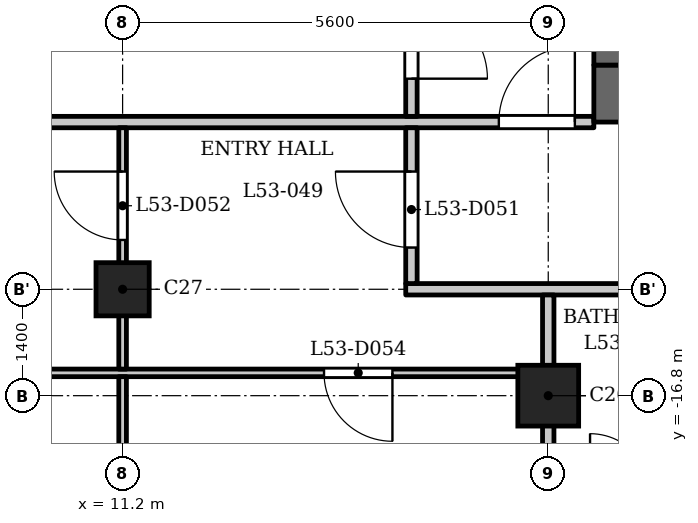
"""IFC4 building model, lengths in metres.
Left out: names, types, materials, properties, quantities, classifications, styles, units other than length and angle.
Written with IfcOpenShell. Run it as: python <this file> out.ifc"""

import sys

from ifc_helpers import new_model, si_unit, direction, frame, frame_2d, origin, origin_2d, place, context, subcontext, project, spatial, rectangle, extrude, element, fill, save


model = new_model("IFC4")
c1 = context("Model", 3, precision=1e-05, world=origin(), true_north=direction((0.0, 1.0)))
c2 = subcontext(c1, "Body", "Model", "MODEL_VIEW")
j1 = project(units=[si_unit("LENGTHUNIT", "METRE"), si_unit("PLANEANGLEUNIT", "RADIAN")], contexts=[c1])
p1 = place(None, origin())
s1 = spatial("IfcSite", under=j1, at=p1, CompositionType="ELEMENT")
p2 = place(p1, origin())
s2 = spatial("IfcBuilding", under=s1, at=p2, CompositionType="ELEMENT")
p3 = place(p2, frame((0.0, 0.0, 206.4)))
s3 = spatial("IfcBuildingStorey", under=s2, at=p3, CompositionType="ELEMENT", Elevation=206.4)
p4 = place(p3, frame((16.8, -16.8, 0.0), z_axis=(0.0, 0.0, 1.0), x_axis=(1.0, 0.0, 0.0)))
e1 = element("IfcColumn", 1, at=p4, inside=s3, PredefinedType="COLUMN", context=c2, shape_type="SweptSolid", body=[
    extrude(rectangle(XDim=0.8, YDim=0.8, at=origin_2d()), origin(), (0.0, 0.0, 1.0), 3.5),
])
p5 = place(p3, frame((11.2, -15.4, 0.0), z_axis=(0.0, 0.0, 1.0), x_axis=(1.0, 0.0, 0.0)))
e2 = element("IfcColumn", 2, at=p5, inside=s3, PredefinedType="COLUMN", context=c2, shape_type="SweptSolid", body=[
    extrude(rectangle(XDim=0.7, YDim=0.7, at=origin_2d()), origin(), (0.0, 0.0, 1.0), 3.5),
])
p6 = place(p3, frame((17.4, -12.825, 0.0), z_axis=(0.0, 0.0, 1.0), x_axis=(1.0, 0.0, 0.0)))
e3 = element("IfcWall", 3, at=p6, inside=s3, PredefinedType="SHEAR", context=c2, shape_type="SweptSolid", body=[
    extrude(rectangle(XDim=7.6, YDim=0.75, at=frame_2d((3.8, 0.0))), origin(), (0.0, 0.0, 1.0), 3.2),
])
p7 = place(p3, frame((17.6, -12.45, 0.0), z_axis=(0.0, 0.0, 1.0), x_axis=(0.0, 1.0, 0.0)))
e4 = element("IfcWall", 4, at=p7, inside=s3, PredefinedType="SHEAR", context=c2, shape_type="SweptSolid", body=[
    extrude(rectangle(XDim=24.9, YDim=0.4, at=frame_2d((12.45, 0.0))), origin(), (0.0, 0.0, 1.0), 3.2),
])
p8 = place(p7, frame((8.65, 0.0, 0.0)))
e5 = element("IfcOpeningElement", 5, at=p8, cuts=e4, PredefinedType="OPENING", context=c2, shape_type="SweptSolid", body=[
    extrude(rectangle(XDim=0.9, YDim=2.1, at=frame_2d((0.45, 1.05))), frame((0.0, 0.21, 0.0), z_axis=(0.0, -1.0, 0.0), x_axis=(1.0, 0.0, 0.0)), (0.0, 0.0, 1.0), 0.42),
])
p9 = place(p7, frame((15.6, 0.0, 0.0)))
e6 = element("IfcOpeningElement", 6, at=p9, cuts=e4, PredefinedType="OPENING", context=c2, shape_type="SweptSolid", body=[
    extrude(rectangle(XDim=1.1, YDim=2.1, at=frame_2d((0.55, 1.05))), frame((0.0, 0.21, 0.0), z_axis=(0.0, -1.0, 0.0), x_axis=(1.0, 0.0, 0.0)), (0.0, 0.0, 1.0), 0.42),
])
p10 = place(p7, frame((18.0, 0.0, 0.0)))
e7 = element("IfcOpeningElement", 7, at=p10, cuts=e4, PredefinedType="OPENING", context=c2, shape_type="SweptSolid", body=[
    extrude(rectangle(XDim=1.1, YDim=2.1, at=frame_2d((0.55, 1.05))), frame((0.0, 0.21, 0.0), z_axis=(0.0, -1.0, 0.0), x_axis=(1.0, 0.0, 0.0)), (0.0, 0.0, 1.0), 0.42),
])
p11 = place(p7, frame((23.025, 0.0, 0.0)))
e8 = element("IfcOpeningElement", 8, at=p11, cuts=e4, PredefinedType="OPENING", context=c2, shape_type="SweptSolid", body=[
    extrude(rectangle(XDim=1.1, YDim=2.1, at=frame_2d((0.55, 1.05))), frame((0.0, 0.21, 0.0), z_axis=(0.0, -1.0, 0.0), x_axis=(1.0, 0.0, 0.0)), (0.0, 0.0, 1.0), 0.42),
])
p12 = place(p7, frame((0.775, 0.0, 0.0)))
e9 = element("IfcOpeningElement", 9, at=p12, cuts=e4, PredefinedType="OPENING", context=c2, shape_type="SweptSolid", body=[
    extrude(rectangle(XDim=1.1, YDim=2.1, at=frame_2d((0.55, 1.05))), frame((0.0, 0.21, 0.0), z_axis=(0.0, -1.0, 0.0), x_axis=(1.0, 0.0, 0.0)), (0.0, 0.0, 1.0), 0.42),
])
p13 = place(p7, frame((12.925, 0.0, 0.0)))
e10 = element("IfcOpeningElement", 10, at=p13, cuts=e4, PredefinedType="OPENING", context=c2, shape_type="SweptSolid", body=[
    extrude(rectangle(XDim=1.8, YDim=2.1, at=frame_2d((0.9, 1.05))), frame((0.0, 0.21, 0.0), z_axis=(0.0, -1.0, 0.0), x_axis=(1.0, 0.0, 0.0)), (0.0, 0.0, 1.0), 0.42),
])
p14 = place(p3, frame((-16.725, -16.5, 0.0), z_axis=(0.0, 0.0, 1.0), x_axis=(1.0, 0.0, 0.0)))
e11 = element("IfcWall", 11, at=p14, inside=s3, PredefinedType="PARTITIONING", context=c2, shape_type="SweptSolid", body=[
    extrude(rectangle(XDim=33.45, YDim=0.1, at=frame_2d((16.725, 0.0))), origin(), (0.0, 0.0, 1.0), 3.2),
])
p15 = place(p14, frame((4.075, 0.0, 0.0)))
e12 = element("IfcOpeningElement", 12, at=p15, cuts=e11, PredefinedType="OPENING", context=c2, shape_type="SweptSolid", body=[
    extrude(rectangle(XDim=0.9, YDim=2.1, at=frame_2d((0.45, 1.05))), frame((0.0, 0.06, 0.0), z_axis=(0.0, -1.0, 0.0), x_axis=(1.0, 0.0, 0.0)), (0.0, 0.0, 1.0), 0.12),
])
p16 = place(p14, frame((6.175, 0.0, 0.0)))
e13 = element("IfcOpeningElement", 13, at=p16, cuts=e11, PredefinedType="OPENING", context=c2, shape_type="SweptSolid", body=[
    extrude(rectangle(XDim=0.9, YDim=2.1, at=frame_2d((0.45, 1.05))), frame((0.0, 0.06, 0.0), z_axis=(0.0, -1.0, 0.0), x_axis=(1.0, 0.0, 0.0)), (0.0, 0.0, 1.0), 0.12),
])
p17 = place(p14, frame((30.575, 0.0, 0.0)))
e14 = element("IfcOpeningElement", 14, at=p17, cuts=e11, PredefinedType="OPENING", context=c2, shape_type="SweptSolid", body=[
    extrude(rectangle(XDim=0.9, YDim=2.1, at=frame_2d((0.45, 1.05))), frame((0.0, 0.06, 0.0), z_axis=(0.0, -1.0, 0.0), x_axis=(1.0, 0.0, 0.0)), (0.0, 0.0, 1.0), 0.12),
])
p18 = place(p14, frame((22.975, 0.0, 0.0)))
e15 = element("IfcOpeningElement", 15, at=p18, cuts=e11, PredefinedType="OPENING", context=c2, shape_type="SweptSolid", body=[
    extrude(rectangle(XDim=0.9, YDim=2.1, at=frame_2d((0.45, 1.05))), frame((0.0, 0.06, 0.0), z_axis=(0.0, -1.0, 0.0), x_axis=(1.0, 0.0, 0.0)), (0.0, 0.0, 1.0), 0.12),
])
p19 = place(p3, frame((14.925, -15.4, 0.0), z_axis=(0.0, 0.0, 1.0), x_axis=(1.0, 0.0, 0.0)))
e16 = element("IfcWall", 16, at=p19, inside=s3, PredefinedType="PARTITIONING", context=c2, shape_type="SweptSolid", body=[
    extrude(rectangle(XDim=9.759, YDim=0.15, at=frame_2d((4.879, 0.0))), origin(), (0.0, 0.0, 1.0), 3.2),
])
p20 = place(p19, frame((4.525, 0.0, 0.0)))
e17 = element("IfcOpeningElement", 17, at=p20, cuts=e16, PredefinedType="OPENING", context=c2, shape_type="SweptSolid", body=[
    extrude(rectangle(XDim=1.0, YDim=2.1, at=frame_2d((0.5, 1.05))), frame((0.0, 0.085, 0.0), z_axis=(0.0, -1.0, 0.0), x_axis=(1.0, 0.0, 0.0)), (0.0, 0.0, 1.0), 0.17),
])
p21 = place(p3, frame((-17.4, -13.2, 0.0), z_axis=(0.0, 0.0, 1.0), x_axis=(1.0, 0.0, 0.0)))
e18 = element("IfcWall", 18, at=p21, inside=s3, PredefinedType="PARTITIONING", context=c2, shape_type="SweptSolid", body=[
    extrude(rectangle(XDim=34.8, YDim=0.15, at=frame_2d((17.4, 0.0))), origin(), (0.0, 0.0, 1.0), 3.2),
])
p22 = place(p21, frame((0.15, 0.0, 0.0)))
e19 = element("IfcOpeningElement", 19, at=p22, cuts=e18, PredefinedType="OPENING", context=c2, shape_type="SweptSolid", body=[
    extrude(rectangle(XDim=1.0, YDim=2.1, at=frame_2d((0.5, 1.05))), frame((0.0, 0.085, 0.0), z_axis=(0.0, -1.0, 0.0), x_axis=(1.0, 0.0, 0.0)), (0.0, 0.0, 1.0), 0.17),
])
p23 = place(p21, frame((33.55, 0.0, 0.0)))
e20 = element("IfcOpeningElement", 20, at=p23, cuts=e18, PredefinedType="OPENING", context=c2, shape_type="SweptSolid", body=[
    extrude(rectangle(XDim=1.0, YDim=2.1, at=frame_2d((0.5, 1.05))), frame((0.0, 0.085, 0.0), z_axis=(0.0, -1.0, 0.0), x_axis=(1.0, 0.0, 0.0)), (0.0, 0.0, 1.0), 0.17),
])
p24 = place(p3, frame((11.2, -22.08, 0.0), z_axis=(0.0, 0.0, 1.0), x_axis=(0.0, 1.0, 0.0)))
e21 = element("IfcWall", 21, at=p24, inside=s3, PredefinedType="PARTITIONING", context=c2, shape_type="SweptSolid", body=[
    extrude(rectangle(XDim=5.53, YDim=0.1, at=frame_2d((2.765, 0.0))), origin(), (0.0, 0.0, 1.0), 3.2),
])
p25 = place(p3, frame((11.2, -16.45, 0.0), z_axis=(0.0, 0.0, 1.0), x_axis=(0.0, 1.0, 0.0)))
e22 = element("IfcWall", 22, at=p25, inside=s3, PredefinedType="PARTITIONING", context=c2, shape_type="SweptSolid", body=[
    extrude(rectangle(XDim=3.175, YDim=0.1, at=frame_2d((1.587, 0.0))), origin(), (0.0, 0.0, 1.0), 3.2),
])
p26 = place(p25, frame((1.699, 0.0, 0.0)))
e23 = element("IfcOpeningElement", 23, at=p26, cuts=e22, PredefinedType="OPENING", context=c2, shape_type="SweptSolid", body=[
    extrude(rectangle(XDim=0.9, YDim=2.1, at=frame_2d((0.45, 1.05))), frame((0.0, 0.06, 0.0), z_axis=(0.0, -1.0, 0.0), x_axis=(1.0, 0.0, 0.0)), (0.0, 0.0, 1.0), 0.12),
])
p27 = place(p3, frame((15.0, -15.325, 0.0), z_axis=(0.0, 0.0, 1.0), x_axis=(0.0, 1.0, 0.0)))
e24 = element("IfcWall", 24, at=p27, inside=s3, PredefinedType="PARTITIONING", context=c2, shape_type="SweptSolid", body=[
    extrude(rectangle(XDim=2.05, YDim=0.15, at=frame_2d((1.025, 0.0))), origin(), (0.0, 0.0, 1.0), 3.2),
])
p28 = place(p27, frame((0.474, 0.0, 0.0)))
e25 = element("IfcOpeningElement", 25, at=p28, cuts=e24, PredefinedType="OPENING", context=c2, shape_type="SweptSolid", body=[
    extrude(rectangle(XDim=1.0, YDim=2.1, at=frame_2d((0.5, 1.05))), frame((0.0, 0.085, 0.0), z_axis=(0.0, -1.0, 0.0), x_axis=(1.0, 0.0, 0.0)), (0.0, 0.0, 1.0), 0.17),
])
p29 = place(p3, frame((15.0, -13.125, 0.0), z_axis=(0.0, 0.0, 1.0), x_axis=(0.0, 1.0, 0.0)))
e26 = element("IfcWall", 26, at=p29, inside=s3, PredefinedType="PARTITIONING", context=c2, shape_type="SweptSolid", body=[
    extrude(rectangle(XDim=6.356, YDim=0.15, at=frame_2d((3.178, 0.0))), origin(), (0.0, 0.0, 1.0), 3.2),
])
p30 = place(p29, frame((0.496, 0.0, 0.0)))
e27 = element("IfcOpeningElement", 27, at=p30, cuts=e26, PredefinedType="OPENING", context=c2, shape_type="SweptSolid", body=[
    extrude(rectangle(XDim=1.0, YDim=2.1, at=frame_2d((0.5, 1.05))), frame((0.0, 0.085, 0.0), z_axis=(0.0, -1.0, 0.0), x_axis=(1.0, 0.0, 0.0)), (0.0, 0.0, 1.0), 0.17),
])
p31 = place(p3, frame((16.8, -22.31, 0.0), z_axis=(0.0, 0.0, 1.0), x_axis=(0.0, 1.0, 0.0)))
e28 = element("IfcWall", 28, at=p31, inside=s3, PredefinedType="PARTITIONING", context=c2, shape_type="SweptSolid", body=[
    extrude(rectangle(XDim=6.835, YDim=0.15, at=frame_2d((3.417, 0.0))), origin(), (0.0, 0.0, 1.0), 2.55),
])
p32 = place(p30, origin())
e29 = element("IfcDoor", 29, at=p32, inside=s3, OperationType="SINGLE_SWING_LEFT", PredefinedType="DOOR", context=c2, shape_type="SweptSolid", body=[
    extrude(rectangle(XDim=1.0, YDim=2.1, at=frame_2d((0.5, 1.05))), frame((0.0, 0.025, 0.0), z_axis=(0.0, -1.0, 0.0), x_axis=(1.0, 0.0, 0.0)), (0.0, 0.0, 1.0), 0.05),
])
fill(e27, e29)
p33 = place(p23, origin())
e30 = element("IfcDoor", 30, at=p33, inside=s3, OperationType="SINGLE_SWING_LEFT", PredefinedType="DOOR", context=c2, shape_type="SweptSolid", body=[
    extrude(rectangle(XDim=1.0, YDim=2.1, at=frame_2d((0.5, 1.05))), frame((0.0, 0.025, 0.0), z_axis=(0.0, -1.0, 0.0), x_axis=(1.0, 0.0, 0.0)), (0.0, 0.0, 1.0), 0.05),
])
fill(e20, e30)
p34 = place(p28, origin())
e31 = element("IfcDoor", 31, at=p34, inside=s3, OperationType="SINGLE_SWING_LEFT", PredefinedType="DOOR", context=c2, shape_type="SweptSolid", body=[
    extrude(rectangle(XDim=1.0, YDim=2.1, at=frame_2d((0.5, 1.05))), frame((0.0, 0.025, 0.0), z_axis=(0.0, -1.0, 0.0), x_axis=(1.0, 0.0, 0.0)), (0.0, 0.0, 1.0), 0.05),
])
fill(e25, e31)
p35 = place(p26, origin())
e32 = element("IfcDoor", 32, at=p35, inside=s3, OperationType="SINGLE_SWING_LEFT", PredefinedType="DOOR", context=c2, shape_type="SweptSolid", body=[
    extrude(rectangle(XDim=0.9, YDim=2.1, at=frame_2d((0.45, 1.05))), frame((0.0, 0.025, 0.0), z_axis=(0.0, -1.0, 0.0), x_axis=(1.0, 0.0, 0.0)), (0.0, 0.0, 1.0), 0.05),
])
fill(e23, e32)
p36 = place(p17, origin())
e33 = element("IfcDoor", 33, at=p36, inside=s3, OperationType="SINGLE_SWING_RIGHT", PredefinedType="DOOR", context=c2, shape_type="SweptSolid", body=[
    extrude(rectangle(XDim=0.9, YDim=2.1, at=frame_2d((0.45, 1.05))), frame((0.0, 0.025, 0.0), z_axis=(0.0, -1.0, 0.0), x_axis=(1.0, 0.0, 0.0)), (0.0, 0.0, 1.0), 0.05),
])
fill(e14, e33)
save(model, sys.argv[1])
